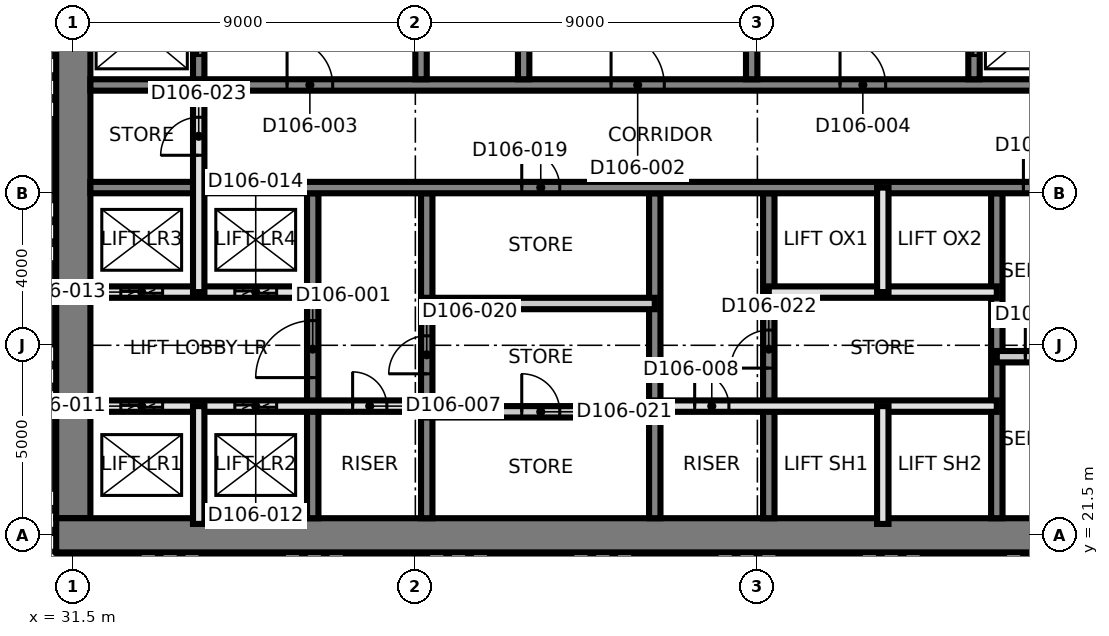
"""IFC4 building model, lengths in metres.
Left out: names, types, materials, properties, quantities, classifications, styles, units other than length and angle.
Written with IfcOpenShell. Run it as: python <this file> out.ifc"""

import sys

from ifc_helpers import new_model, si_unit, direction, frame, frame_2d, origin, place, context, subcontext, project, spatial, rectangle, extrude, element, fill, save


model = new_model("IFC4")
c1 = context("Model", 3, precision=1e-05, world=origin(), true_north=direction((0.0, 1.0)))
c2 = subcontext(c1, "Body", "Model", "MODEL_VIEW")
j1 = project(units=[si_unit("LENGTHUNIT", "METRE"), si_unit("PLANEANGLEUNIT", "RADIAN")], contexts=[c1])
p1 = place(None, origin())
s1 = spatial("IfcSite", under=j1, at=p1, CompositionType="ELEMENT")
p2 = place(p1, origin())
s2 = spatial("IfcBuilding", under=s1, at=p2, CompositionType="ELEMENT")
p3 = place(p2, frame((0.0, 0.0, 23.5)))
s3 = spatial("IfcBuildingStorey", under=s2, at=p3, CompositionType="ELEMENT", Elevation=23.5)
p4 = place(p3, frame((31.5, 21.95, 0.0), z_axis=(0.0, 0.0, 1.0), x_axis=(0.0, 1.0, 0.0)))
e1 = element("IfcWall", 1, at=p4, inside=s3, PredefinedType="SHEAR", context=c2, shape_type="SweptSolid", body=[
    extrude(rectangle(XDim=17.1, YDim=0.9, at=frame_2d((8.55, 0.0))), origin(), (0.0, 0.0, 1.0), 5.0),
])
p5 = place(p3, frame((31.05, 21.5, 0.0), z_axis=(0.0, 0.0, 1.0), x_axis=(1.0, 0.0, 0.0)))
e2 = element("IfcWall", 2, at=p5, inside=s3, PredefinedType="SHEAR", context=c2, shape_type="SweptSolid", body=[
    extrude(rectangle(XDim=27.0, YDim=0.9, at=frame_2d((13.5, 0.0))), origin(), (0.0, 0.0, 1.0), 5.0),
])
p6 = place(p3, frame((37.8, 21.95, 0.0), z_axis=(0.0, 0.0, 1.0), x_axis=(0.0, 1.0, 0.0)))
e3 = element("IfcWall", 3, at=p6, inside=s3, PredefinedType="SHEAR", context=c2, shape_type="SweptSolid", body=[
    extrude(rectangle(XDim=8.55, YDim=0.3, at=frame_2d((4.275, 0.0))), origin(), (0.0, 0.0, 1.0), 5.0),
])
p7 = place(p6, frame((3.7, 0.0, 0.0)))
e4 = element("IfcOpeningElement", 4, at=p7, cuts=e3, PredefinedType="OPENING", context=c2, shape_type="SweptSolid", body=[
    extrude(rectangle(XDim=1.5, YDim=2.1, at=frame_2d((0.75, 1.05))), frame((0.0, 0.16, 0.0), z_axis=(0.0, -1.0, 0.0), x_axis=(1.0, 0.0, 0.0)), (0.0, 0.0, 1.0), 0.32),
])
p8 = place(p3, frame((40.8, 21.95, 0.0), z_axis=(0.0, 0.0, 1.0), x_axis=(0.0, 1.0, 0.0)))
e5 = element("IfcWall", 5, at=p8, inside=s3, PredefinedType="SHEAR", context=c2, shape_type="SweptSolid", body=[
    extrude(rectangle(XDim=8.55, YDim=0.3, at=frame_2d((4.275, 0.0))), origin(), (0.0, 0.0, 1.0), 5.0),
])
p9 = place(p8, frame((3.8, 0.0, 0.0)))
e6 = element("IfcOpeningElement", 6, at=p9, cuts=e5, PredefinedType="OPENING", context=c2, shape_type="SweptSolid", body=[
    extrude(rectangle(XDim=1.0, YDim=2.1, at=frame_2d((0.5, 1.05))), frame((0.0, 0.16, 0.0), z_axis=(0.0, -1.0, 0.0), x_axis=(1.0, 0.0, 0.0)), (0.0, 0.0, 1.0), 0.32),
])
p10 = place(p3, frame((46.8, 21.95, 0.0), z_axis=(0.0, 0.0, 1.0), x_axis=(0.0, 1.0, 0.0)))
e7 = element("IfcWall", 7, at=p10, inside=s3, PredefinedType="SHEAR", context=c2, shape_type="SweptSolid", body=[
    extrude(rectangle(XDim=8.55, YDim=0.3, at=frame_2d((4.275, 0.0))), origin(), (0.0, 0.0, 1.0), 5.0),
])
p11 = place(p3, frame((49.8, 21.95, 0.0), z_axis=(0.0, 0.0, 1.0), x_axis=(0.0, 1.0, 0.0)))
e8 = element("IfcWall", 8, at=p11, inside=s3, PredefinedType="SHEAR", context=c2, shape_type="SweptSolid", body=[
    extrude(rectangle(XDim=8.55, YDim=0.3, at=frame_2d((4.275, 0.0))), origin(), (0.0, 0.0, 1.0), 5.0),
])
p12 = place(p11, frame((3.95, 0.0, 0.0)))
e9 = element("IfcOpeningElement", 9, at=p12, cuts=e8, PredefinedType="OPENING", context=c2, shape_type="SweptSolid", body=[
    extrude(rectangle(XDim=1.0, YDim=2.1, at=frame_2d((0.5, 1.05))), frame((0.0, 0.16, 0.0), z_axis=(0.0, -1.0, 0.0), x_axis=(1.0, 0.0, 0.0)), (0.0, 0.0, 1.0), 0.32),
])
p13 = place(p3, frame((55.8, 21.95, 0.0), z_axis=(0.0, 0.0, 1.0), x_axis=(0.0, 1.0, 0.0)))
e10 = element("IfcWall", 10, at=p13, inside=s3, PredefinedType="SHEAR", context=c2, shape_type="SweptSolid", body=[
    extrude(rectangle(XDim=8.55, YDim=0.3, at=frame_2d((4.275, 0.0))), origin(), (0.0, 0.0, 1.0), 5.0),
])
p14 = place(p3, frame((31.95, 30.65, 0.0), z_axis=(0.0, 0.0, 1.0), x_axis=(1.0, 0.0, 0.0)))
e11 = element("IfcWall", 11, at=p14, inside=s3, PredefinedType="SHEAR", context=c2, shape_type="SweptSolid", body=[
    extrude(rectangle(XDim=26.1, YDim=0.3, at=frame_2d((13.05, 0.0))), origin(), (0.0, 0.0, 1.0), 5.0),
])
p15 = place(p14, frame((24.55, 0.0, 0.0)))
e12 = element("IfcOpeningElement", 12, at=p15, cuts=e11, PredefinedType="OPENING", context=c2, shape_type="SweptSolid", body=[
    extrude(rectangle(XDim=1.0, YDim=2.1, at=frame_2d((0.5, 1.05))), frame((0.0, 0.16, 0.0), z_axis=(0.0, -1.0, 0.0), x_axis=(1.0, 0.0, 0.0)), (0.0, 0.0, 1.0), 0.32),
])
p16 = place(p14, frame((11.35, 0.0, 0.0)))
e13 = element("IfcOpeningElement", 13, at=p16, cuts=e11, PredefinedType="OPENING", context=c2, shape_type="SweptSolid", body=[
    extrude(rectangle(XDim=1.0, YDim=2.1, at=frame_2d((0.5, 1.05))), frame((0.0, 0.16, 0.0), z_axis=(0.0, -1.0, 0.0), x_axis=(1.0, 0.0, 0.0)), (0.0, 0.0, 1.0), 0.32),
])
p17 = place(p3, frame((31.95, 33.35, 0.0), z_axis=(0.0, 0.0, 1.0), x_axis=(1.0, 0.0, 0.0)))
e14 = element("IfcWall", 14, at=p17, inside=s3, PredefinedType="SHEAR", context=c2, shape_type="SweptSolid", body=[
    extrude(rectangle(XDim=26.1, YDim=0.3, at=frame_2d((13.05, 0.0))), origin(), (0.0, 0.0, 1.0), 5.0),
])
p18 = place(p17, frame((13.7, 0.0, 0.0)))
e15 = element("IfcOpeningElement", 15, at=p18, cuts=e14, PredefinedType="OPENING", context=c2, shape_type="SweptSolid", body=[
    extrude(rectangle(XDim=1.4, YDim=2.1, at=frame_2d((0.7, 1.05))), frame((0.0, 0.16, 0.0), z_axis=(0.0, -1.0, 0.0), x_axis=(1.0, 0.0, 0.0)), (0.0, 0.0, 1.0), 0.32),
])
p19 = place(p17, frame((5.175, 0.0, 0.0)))
e16 = element("IfcOpeningElement", 16, at=p19, cuts=e14, PredefinedType="OPENING", context=c2, shape_type="SweptSolid", body=[
    extrude(rectangle(XDim=1.2, YDim=2.1, at=frame_2d((0.6, 1.05))), frame((0.0, 0.16, 0.0), z_axis=(0.0, -1.0, 0.0), x_axis=(1.0, 0.0, 0.0)), (0.0, 0.0, 1.0), 0.32),
])
p20 = place(p17, frame((19.725, 0.0, 0.0)))
e17 = element("IfcOpeningElement", 17, at=p20, cuts=e14, PredefinedType="OPENING", context=c2, shape_type="SweptSolid", body=[
    extrude(rectangle(XDim=1.2, YDim=2.1, at=frame_2d((0.6, 1.05))), frame((0.0, 0.16, 0.0), z_axis=(0.0, -1.0, 0.0), x_axis=(1.0, 0.0, 0.0)), (0.0, 0.0, 1.0), 0.32),
])
for number, where, z_axis, x_axis in (
    (18, (40.65, 33.5, 0.0), (0.0, 0.0, 1.0), (0.0, 1.0, 0.0)),
    (19, (43.35, 33.5, 0.0), (0.0, 0.0, 1.0), (0.0, 1.0, 0.0)),
):
    element("IfcWall", number, at=place(p3, frame(where, z_axis=z_axis, x_axis=x_axis)), inside=s3, PredefinedType="SHEAR", context=c2, shape_type="SweptSolid", body=[
        extrude(rectangle(XDim=5.55, YDim=0.3, at=frame_2d((2.775, 0.0))), origin(), (0.0, 0.0, 1.0), 5.0),
    ])
p21 = place(p3, frame((34.8, 33.5, 0.0), z_axis=(0.0, 0.0, 1.0), x_axis=(0.0, 1.0, 0.0)))
e20 = element("IfcWall", 20, at=p21, inside=s3, PredefinedType="SHEAR", context=c2, shape_type="SweptSolid", body=[
    extrude(rectangle(XDim=2.55, YDim=0.3, at=frame_2d((1.275, 0.0))), origin(), (0.0, 0.0, 1.0), 5.0),
])
p22 = place(p21, frame((0.625, 0.0, 0.0)))
e21 = element("IfcOpeningElement", 21, at=p22, cuts=e20, PredefinedType="OPENING", context=c2, shape_type="SweptSolid", body=[
    extrude(rectangle(XDim=1.3, YDim=2.4, at=frame_2d((0.65, 1.2))), frame((0.0, 0.16, 0.0), z_axis=(0.0, -1.0, 0.0), x_axis=(1.0, 0.0, 0.0)), (0.0, 0.0, 1.0), 0.32),
])
p23 = place(p3, frame((49.35, 33.5, 0.0), z_axis=(0.0, 0.0, 1.0), x_axis=(0.0, 1.0, 0.0)))
e22 = element("IfcWall", 22, at=p23, inside=s3, PredefinedType="SHEAR", context=c2, shape_type="SweptSolid", body=[
    extrude(rectangle(XDim=5.55, YDim=0.3, at=frame_2d((2.775, 0.0))), origin(), (0.0, 0.0, 1.0), 5.0),
])
p24 = place(p3, frame((55.2, 33.5, 0.0), z_axis=(0.0, 0.0, 1.0), x_axis=(0.0, 1.0, 0.0)))
e23 = element("IfcWall", 23, at=p24, inside=s3, PredefinedType="SHEAR", context=c2, shape_type="SweptSolid", body=[
    extrude(rectangle(XDim=2.55, YDim=0.3, at=frame_2d((1.275, 0.0))), origin(), (0.0, 0.0, 1.0), 5.0),
])
p25 = place(p24, frame((0.625, 0.0, 0.0)))
e24 = element("IfcOpeningElement", 24, at=p25, cuts=e23, PredefinedType="OPENING", context=c2, shape_type="SweptSolid", body=[
    extrude(rectangle(XDim=1.3, YDim=2.4, at=frame_2d((0.65, 1.2))), frame((0.0, 0.16, 0.0), z_axis=(0.0, -1.0, 0.0), x_axis=(1.0, 0.0, 0.0)), (0.0, 0.0, 1.0), 0.32),
])
p26 = place(p3, frame((40.8, 24.75, 0.0), z_axis=(0.0, 0.0, 1.0), x_axis=(1.0, 0.0, 0.0)))
e25 = element("IfcWall", 25, at=p26, inside=s3, PredefinedType="PARTITIONING", context=c2, shape_type="SweptSolid", body=[
    extrude(rectangle(XDim=6.0, YDim=0.3, at=frame_2d((3.0, 0.0))), origin(), (0.0, 0.0, 1.0), 4.7),
])
p27 = place(p26, frame((2.5, 0.0, 0.0)))
e26 = element("IfcOpeningElement", 26, at=p27, cuts=e25, PredefinedType="OPENING", context=c2, shape_type="SweptSolid", body=[
    extrude(rectangle(XDim=1.0, YDim=2.1, at=frame_2d((0.5, 1.05))), frame((0.0, 0.16, 0.0), z_axis=(0.0, -1.0, 0.0), x_axis=(1.0, 0.0, 0.0)), (0.0, 0.0, 1.0), 0.32),
])
p28 = place(p3, frame((31.8, 24.9, 0.0), z_axis=(0.0, 0.0, 1.0), x_axis=(1.0, 0.0, 0.0)))
e27 = element("IfcWall", 27, at=p28, inside=s3, PredefinedType="SOLIDWALL", context=c2, shape_type="SweptSolid", body=[
    extrude(rectangle(XDim=9.0, YDim=0.3, at=frame_2d((4.5, 0.0))), origin(), (0.0, 0.0, 1.0), 4.7),
])
p29 = place(p28, frame((7.05, 0.0, 0.0)))
e28 = element("IfcOpeningElement", 28, at=p29, cuts=e27, PredefinedType="OPENING", context=c2, shape_type="SweptSolid", body=[
    extrude(rectangle(XDim=0.9, YDim=2.1, at=frame_2d((0.45, 1.05))), frame((0.0, 0.16, 0.0), z_axis=(0.0, -1.0, 0.0), x_axis=(1.0, 0.0, 0.0)), (0.0, 0.0, 1.0), 0.32),
])
p30 = place(p28, frame((0.95, 0.0, 0.0)))
e29 = element("IfcOpeningElement", 29, at=p30, cuts=e27, PredefinedType="OPENING", context=c2, shape_type="SweptSolid", body=[
    extrude(rectangle(XDim=1.1, YDim=2.4, at=frame_2d((0.55, 1.2))), frame((0.0, 0.16, 0.0), z_axis=(0.0, -1.0, 0.0), x_axis=(1.0, 0.0, 0.0)), (0.0, 0.0, 1.0), 0.32),
])
p31 = place(p28, frame((3.95, 0.0, 0.0)))
e30 = element("IfcOpeningElement", 30, at=p31, cuts=e27, PredefinedType="OPENING", context=c2, shape_type="SweptSolid", body=[
    extrude(rectangle(XDim=1.1, YDim=2.4, at=frame_2d((0.55, 1.2))), frame((0.0, 0.16, 0.0), z_axis=(0.0, -1.0, 0.0), x_axis=(1.0, 0.0, 0.0)), (0.0, 0.0, 1.0), 0.32),
])
p32 = place(p3, frame((46.8, 24.9, 0.0), z_axis=(0.0, 0.0, 1.0), x_axis=(1.0, 0.0, 0.0)))
e31 = element("IfcWall", 31, at=p32, inside=s3, PredefinedType="SOLIDWALL", context=c2, shape_type="SweptSolid", body=[
    extrude(rectangle(XDim=9.0, YDim=0.3, at=frame_2d((4.5, 0.0))), origin(), (0.0, 0.0, 1.0), 4.7),
])
p33 = place(p32, frame((1.05, 0.0, 0.0)))
e32 = element("IfcOpeningElement", 32, at=p33, cuts=e31, PredefinedType="OPENING", context=c2, shape_type="SweptSolid", body=[
    extrude(rectangle(XDim=0.9, YDim=2.1, at=frame_2d((0.45, 1.05))), frame((0.0, 0.16, 0.0), z_axis=(0.0, -1.0, 0.0), x_axis=(1.0, 0.0, 0.0)), (0.0, 0.0, 1.0), 0.32),
])
p34 = place(p3, frame((55.8, 26.2, 0.0), z_axis=(0.0, 0.0, 1.0), x_axis=(1.0, 0.0, 0.0)))
e33 = element("IfcWall", 33, at=p34, inside=s3, PredefinedType="PARTITIONING", context=c2, shape_type="SweptSolid", body=[
    extrude(rectangle(XDim=2.4, YDim=0.3, at=frame_2d((1.2, 0.0))), origin(), (0.0, 0.0, 1.0), 4.7),
])
p35 = place(p34, frame((0.75, 0.0, 0.0)))
e34 = element("IfcOpeningElement", 34, at=p35, cuts=e33, PredefinedType="OPENING", context=c2, shape_type="SweptSolid", body=[
    extrude(rectangle(XDim=0.9, YDim=2.1, at=frame_2d((0.45, 1.05))), frame((0.0, 0.16, 0.0), z_axis=(0.0, -1.0, 0.0), x_axis=(1.0, 0.0, 0.0)), (0.0, 0.0, 1.0), 0.32),
])
p36 = place(p3, frame((40.8, 27.6, 0.0), z_axis=(0.0, 0.0, 1.0), x_axis=(1.0, 0.0, 0.0)))
e35 = element("IfcWall", 35, at=p36, inside=s3, PredefinedType="PARTITIONING", context=c2, shape_type="SweptSolid", body=[
    extrude(rectangle(XDim=6.0, YDim=0.3, at=frame_2d((3.0, 0.0))), origin(), (0.0, 0.0, 1.0), 4.7),
])
p37 = place(p3, frame((31.8, 27.9, 0.0), z_axis=(0.0, 0.0, 1.0), x_axis=(1.0, 0.0, 0.0)))
e36 = element("IfcWall", 36, at=p37, inside=s3, PredefinedType="SOLIDWALL", context=c2, shape_type="SweptSolid", body=[
    extrude(rectangle(XDim=6.0, YDim=0.3, at=frame_2d((3.0, 0.0))), origin(), (0.0, 0.0, 1.0), 4.7),
])
p38 = place(p37, frame((0.95, 0.0, 0.0)))
e37 = element("IfcOpeningElement", 37, at=p38, cuts=e36, PredefinedType="OPENING", context=c2, shape_type="SweptSolid", body=[
    extrude(rectangle(XDim=1.1, YDim=2.4, at=frame_2d((0.55, 1.2))), frame((0.0, 0.16, 0.0), z_axis=(0.0, -1.0, 0.0), x_axis=(1.0, 0.0, 0.0)), (0.0, 0.0, 1.0), 0.32),
])
p39 = place(p37, frame((3.95, 0.0, 0.0)))
e38 = element("IfcOpeningElement", 38, at=p39, cuts=e36, PredefinedType="OPENING", context=c2, shape_type="SweptSolid", body=[
    extrude(rectangle(XDim=1.1, YDim=2.4, at=frame_2d((0.55, 1.2))), frame((0.0, 0.16, 0.0), z_axis=(0.0, -1.0, 0.0), x_axis=(1.0, 0.0, 0.0)), (0.0, 0.0, 1.0), 0.32),
])
p40 = place(p3, frame((49.8, 27.9, 0.0), z_axis=(0.0, 0.0, 1.0), x_axis=(1.0, 0.0, 0.0)))
e39 = element("IfcWall", 39, at=p40, inside=s3, PredefinedType="SOLIDWALL", context=c2, shape_type="SweptSolid", body=[
    extrude(rectangle(XDim=6.0, YDim=0.3, at=frame_2d((3.0, 0.0))), origin(), (0.0, 0.0, 1.0), 4.7),
])
p41 = place(p3, frame((34.8, 21.8, 0.0), z_axis=(0.0, 0.0, 1.0), x_axis=(0.0, 1.0, 0.0)))
e40 = element("IfcWall", 40, at=p41, inside=s3, PredefinedType="SOLIDWALL", context=c2, shape_type="SweptSolid", body=[
    extrude(rectangle(XDim=3.1, YDim=0.3, at=frame_2d((1.55, 0.0))), origin(), (0.0, 0.0, 1.0), 4.7),
])
p42 = place(p3, frame((34.8, 27.9, 0.0), z_axis=(0.0, 0.0, 1.0), x_axis=(0.0, 1.0, 0.0)))
e41 = element("IfcWall", 41, at=p42, inside=s3, PredefinedType="SOLIDWALL", context=c2, shape_type="SweptSolid", body=[
    extrude(rectangle(XDim=5.45, YDim=0.3, at=frame_2d((2.725, 0.0))), origin(), (0.0, 0.0, 1.0), 4.7),
])
p43 = place(p42, frame((3.6, 0.0, 0.0)))
e42 = element("IfcOpeningElement", 42, at=p43, cuts=e41, PredefinedType="OPENING", context=c2, shape_type="SweptSolid", body=[
    extrude(rectangle(XDim=1.0, YDim=2.1, at=frame_2d((0.5, 1.05))), frame((0.0, 0.16, 0.0), z_axis=(0.0, -1.0, 0.0), x_axis=(1.0, 0.0, 0.0)), (0.0, 0.0, 1.0), 0.32),
])
p44 = place(p3, frame((52.8, 21.8, 0.0), z_axis=(0.0, 0.0, 1.0), x_axis=(0.0, 1.0, 0.0)))
e43 = element("IfcWall", 43, at=p44, inside=s3, PredefinedType="SOLIDWALL", context=c2, shape_type="SweptSolid", body=[
    extrude(rectangle(XDim=3.1, YDim=0.3, at=frame_2d((1.55, 0.0))), origin(), (0.0, 0.0, 1.0), 4.7),
])
p45 = place(p3, frame((52.8, 27.9, 0.0), z_axis=(0.0, 0.0, 1.0), x_axis=(0.0, 1.0, 0.0)))
e44 = element("IfcWall", 44, at=p45, inside=s3, PredefinedType="SOLIDWALL", context=c2, shape_type="SweptSolid", body=[
    extrude(rectangle(XDim=2.75, YDim=0.3, at=frame_2d((1.375, 0.0))), origin(), (0.0, 0.0, 1.0), 4.7),
])
p46 = place(p7, origin())
e45 = element("IfcDoor", 45, at=p46, inside=s3, OperationType="SINGLE_SWING_LEFT", PredefinedType="DOOR", context=c2, shape_type="SweptSolid", body=[
    extrude(rectangle(XDim=1.5, YDim=2.1, at=frame_2d((0.75, 1.05))), frame((0.0, 0.025, 0.0), z_axis=(0.0, -1.0, 0.0), x_axis=(1.0, 0.0, 0.0)), (0.0, 0.0, 1.0), 0.05),
])
fill(e4, e45)
p47 = place(p18, origin())
e46 = element("IfcDoor", 46, at=p47, inside=s3, OperationType="SINGLE_SWING_RIGHT", PredefinedType="DOOR", context=c2, shape_type="SweptSolid", body=[
    extrude(rectangle(XDim=1.4, YDim=2.1, at=frame_2d((0.7, 1.05))), frame((0.0, 0.025, 0.0), z_axis=(0.0, -1.0, 0.0), x_axis=(1.0, 0.0, 0.0)), (0.0, 0.0, 1.0), 0.05),
])
fill(e15, e46)
p48 = place(p19, origin())
e47 = element("IfcDoor", 47, at=p48, inside=s3, OperationType="SINGLE_SWING_LEFT", PredefinedType="DOOR", context=c2, shape_type="SweptSolid", body=[
    extrude(rectangle(XDim=1.2, YDim=2.1, at=frame_2d((0.6, 1.05))), frame((0.0, 0.025, 0.0), z_axis=(0.0, -1.0, 0.0), x_axis=(1.0, 0.0, 0.0)), (0.0, 0.0, 1.0), 0.05),
])
fill(e16, e47)
p49 = place(p20, origin())
e48 = element("IfcDoor", 48, at=p49, inside=s3, OperationType="SINGLE_SWING_RIGHT", PredefinedType="DOOR", context=c2, shape_type="SweptSolid", body=[
    extrude(rectangle(XDim=1.2, YDim=2.1, at=frame_2d((0.6, 1.05))), frame((0.0, 0.025, 0.0), z_axis=(0.0, -1.0, 0.0), x_axis=(1.0, 0.0, 0.0)), (0.0, 0.0, 1.0), 0.05),
])
fill(e17, e48)
p50 = place(p29, origin())
e49 = element("IfcDoor", 49, at=p50, inside=s3, OperationType="SINGLE_SWING_LEFT", PredefinedType="DOOR", context=c2, shape_type="SweptSolid", body=[
    extrude(rectangle(XDim=0.9, YDim=2.1, at=frame_2d((0.45, 1.05))), frame((0.0, 0.025, 0.0), z_axis=(0.0, -1.0, 0.0), x_axis=(1.0, 0.0, 0.0)), (0.0, 0.0, 1.0), 0.05),
])
fill(e28, e49)
p51 = place(p33, origin())
e50 = element("IfcDoor", 50, at=p51, inside=s3, OperationType="SINGLE_SWING_RIGHT", PredefinedType="DOOR", context=c2, shape_type="SweptSolid", body=[
    extrude(rectangle(XDim=0.9, YDim=2.1, at=frame_2d((0.45, 1.05))), frame((0.0, 0.025, 0.0), z_axis=(0.0, -1.0, 0.0), x_axis=(1.0, 0.0, 0.0)), (0.0, 0.0, 1.0), 0.05),
])
fill(e32, e50)
p52 = place(p15, origin())
e51 = element("IfcDoor", 51, at=p52, inside=s3, OperationType="SINGLE_SWING_LEFT", PredefinedType="DOOR", context=c2, shape_type="SweptSolid", body=[
    extrude(rectangle(XDim=1.0, YDim=2.1, at=frame_2d((0.5, 1.05))), frame((0.0, 0.025, 0.0), z_axis=(0.0, -1.0, 0.0), x_axis=(1.0, 0.0, 0.0)), (0.0, 0.0, 1.0), 0.05),
])
fill(e12, e51)
p53 = place(p35, origin())
e52 = element("IfcDoor", 52, at=p53, inside=s3, OperationType="SINGLE_SWING_RIGHT", PredefinedType="DOOR", context=c2, shape_type="SweptSolid", body=[
    extrude(rectangle(XDim=0.9, YDim=2.1, at=frame_2d((0.45, 1.05))), frame((0.0, 0.025, 0.0), z_axis=(0.0, -1.0, 0.0), x_axis=(1.0, 0.0, 0.0)), (0.0, 0.0, 1.0), 0.05),
])
fill(e34, e52)
p54 = place(p30, origin())
e53 = element("IfcDoor", 53, at=p54, inside=s3, OperationType="SLIDING_TO_LEFT", PredefinedType="DOOR", context=c2, shape_type="SweptSolid", body=[
    extrude(rectangle(XDim=1.1, YDim=2.4, at=frame_2d((0.55, 1.2))), frame((0.0, 0.025, 0.0), z_axis=(0.0, -1.0, 0.0), x_axis=(1.0, 0.0, 0.0)), (0.0, 0.0, 1.0), 0.05),
])
fill(e29, e53)
p55 = place(p31, origin())
e54 = element("IfcDoor", 54, at=p55, inside=s3, OperationType="SLIDING_TO_LEFT", PredefinedType="DOOR", context=c2, shape_type="SweptSolid", body=[
    extrude(rectangle(XDim=1.1, YDim=2.4, at=frame_2d((0.55, 1.2))), frame((0.0, 0.025, 0.0), z_axis=(0.0, -1.0, 0.0), x_axis=(1.0, 0.0, 0.0)), (0.0, 0.0, 1.0), 0.05),
])
fill(e30, e54)
p56 = place(p38, origin())
e55 = element("IfcDoor", 55, at=p56, inside=s3, OperationType="SLIDING_TO_LEFT", PredefinedType="DOOR", context=c2, shape_type="SweptSolid", body=[
    extrude(rectangle(XDim=1.1, YDim=2.4, at=frame_2d((0.55, 1.2))), frame((0.0, 0.025, 0.0), z_axis=(0.0, -1.0, 0.0), x_axis=(1.0, 0.0, 0.0)), (0.0, 0.0, 1.0), 0.05),
])
fill(e37, e55)
p57 = place(p39, origin())
e56 = element("IfcDoor", 56, at=p57, inside=s3, OperationType="SLIDING_TO_LEFT", PredefinedType="DOOR", context=c2, shape_type="SweptSolid", body=[
    extrude(rectangle(XDim=1.1, YDim=2.4, at=frame_2d((0.55, 1.2))), frame((0.0, 0.025, 0.0), z_axis=(0.0, -1.0, 0.0), x_axis=(1.0, 0.0, 0.0)), (0.0, 0.0, 1.0), 0.05),
])
fill(e38, e56)
p58 = place(p22, origin())
e57 = element("IfcDoor", 57, at=p58, inside=s3, OperationType="SLIDING_TO_LEFT", PredefinedType="DOOR", context=c2, shape_type="SweptSolid", body=[
    extrude(rectangle(XDim=1.3, YDim=2.4, at=frame_2d((0.65, 1.2))), frame((0.0, 0.025, 0.0), z_axis=(0.0, -1.0, 0.0), x_axis=(1.0, 0.0, 0.0)), (0.0, 0.0, 1.0), 0.05),
])
fill(e21, e57)
p59 = place(p25, origin())
e58 = element("IfcDoor", 58, at=p59, inside=s3, OperationType="SLIDING_TO_LEFT", PredefinedType="DOOR", context=c2, shape_type="SweptSolid", body=[
    extrude(rectangle(XDim=1.3, YDim=2.4, at=frame_2d((0.65, 1.2))), frame((0.0, 0.025, 0.0), z_axis=(0.0, -1.0, 0.0), x_axis=(1.0, 0.0, 0.0)), (0.0, 0.0, 1.0), 0.05),
])
fill(e24, e58)
p60 = place(p16, origin())
e59 = element("IfcDoor", 59, at=p60, inside=s3, OperationType="SINGLE_SWING_LEFT", PredefinedType="DOOR", context=c2, shape_type="SweptSolid", body=[
    extrude(rectangle(XDim=1.0, YDim=2.1, at=frame_2d((0.5, 1.05))), frame((0.0, 0.025, 0.0), z_axis=(0.0, -1.0, 0.0), x_axis=(1.0, 0.0, 0.0)), (0.0, 0.0, 1.0), 0.05),
])
fill(e13, e59)
p61 = place(p9, origin())
e60 = element("IfcDoor", 60, at=p61, inside=s3, OperationType="SINGLE_SWING_RIGHT", PredefinedType="DOOR", context=c2, shape_type="SweptSolid", body=[
    extrude(rectangle(XDim=1.0, YDim=2.1, at=frame_2d((0.5, 1.05))), frame((0.0, 0.025, 0.0), z_axis=(0.0, -1.0, 0.0), x_axis=(1.0, 0.0, 0.0)), (0.0, 0.0, 1.0), 0.05),
])
fill(e6, e60)
p62 = place(p27, origin())
e61 = element("IfcDoor", 61, at=p62, inside=s3, OperationType="SINGLE_SWING_RIGHT", PredefinedType="DOOR", context=c2, shape_type="SweptSolid", body=[
    extrude(rectangle(XDim=1.0, YDim=2.1, at=frame_2d((0.5, 1.05))), frame((0.0, 0.025, 0.0), z_axis=(0.0, -1.0, 0.0), x_axis=(1.0, 0.0, 0.0)), (0.0, 0.0, 1.0), 0.05),
])
fill(e26, e61)
p63 = place(p12, origin())
e62 = element("IfcDoor", 62, at=p63, inside=s3, OperationType="SINGLE_SWING_RIGHT", PredefinedType="DOOR", context=c2, shape_type="SweptSolid", body=[
    extrude(rectangle(XDim=1.0, YDim=2.1, at=frame_2d((0.5, 1.05))), frame((0.0, 0.025, 0.0), z_axis=(0.0, -1.0, 0.0), x_axis=(1.0, 0.0, 0.0)), (0.0, 0.0, 1.0), 0.05),
])
fill(e9, e62)
p64 = place(p43, origin())
e63 = element("IfcDoor", 63, at=p64, inside=s3, OperationType="SINGLE_SWING_LEFT", PredefinedType="DOOR", context=c2, shape_type="SweptSolid", body=[
    extrude(rectangle(XDim=1.0, YDim=2.1, at=frame_2d((0.5, 1.05))), frame((0.0, 0.025, 0.0), z_axis=(0.0, -1.0, 0.0), x_axis=(1.0, 0.0, 0.0)), (0.0, 0.0, 1.0), 0.05),
])
fill(e42, e63)
save(model, sys.argv[1])
